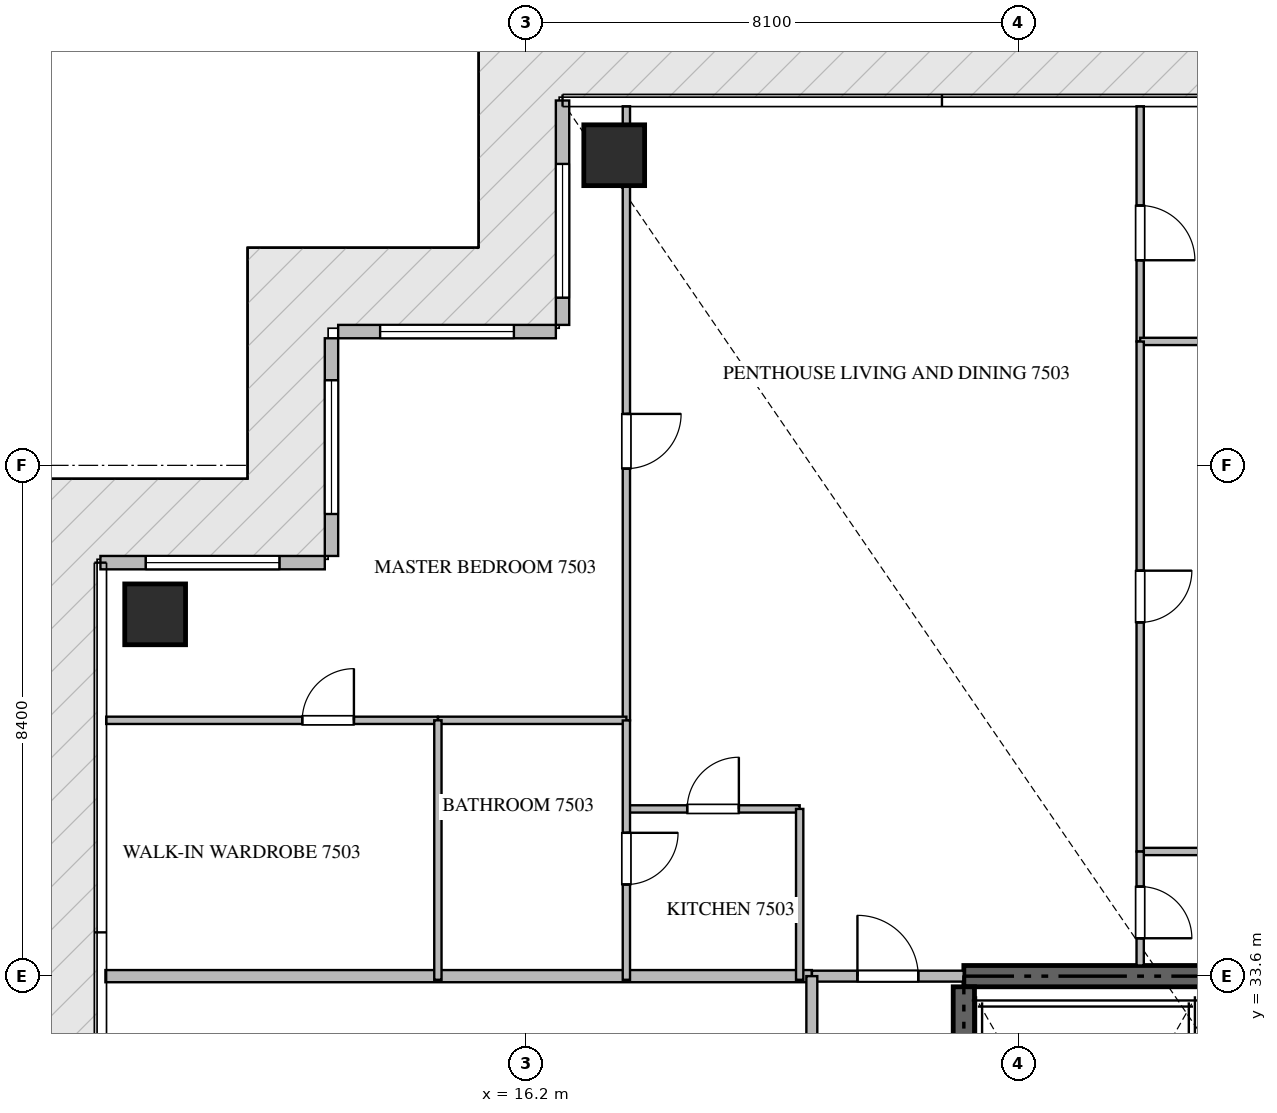
"""IFC4 building model, lengths in metres.
Left out: names, types, materials, properties, quantities, classifications, styles, units other than length and angle.
Written with IfcOpenShell. Run it as: python <this file> out.ifc"""

import sys

from ifc_helpers import new_model, si_unit, direction, frame, frame_2d, origin, origin_2d, place, context, subcontext, project, spatial, rectangle, extrude, source, transform, mapped, element, fill, save


model = new_model("IFC4")
c1 = context("Model", 3, precision=1e-05, world=origin(), true_north=direction((0.0, 1.0)))
c2 = subcontext(c1, "Body", "Model", "MODEL_VIEW")
j1 = project(units=[si_unit("LENGTHUNIT", "METRE"), si_unit("PLANEANGLEUNIT", "RADIAN")], contexts=[c1])
p1 = place(None, origin())
s1 = spatial("IfcSite", under=j1, at=p1, CompositionType="ELEMENT")
p2 = place(p1, origin())
s2 = spatial("IfcBuilding", under=s1, at=p2, CompositionType="ELEMENT")
p3 = place(p2, frame((0.0, 0.0, 301.55)))
s3 = spatial("IfcBuildingStorey", under=s2, at=p3, CompositionType="ELEMENT", Elevation=301.55)
p4 = place(p3, frame((41.4, 33.6, -0.26), z_axis=(0.0, 0.0, 1.0), x_axis=(-1.0, 0.0, 0.0)))
e1 = element("IfcWall", 1, at=p4, inside=s3, PredefinedType="SHEAR", context=c2, shape_type="SweptSolid", body=[
    extrude(rectangle(XDim=18.0, YDim=0.35, at=frame_2d((9.0, 0.0))), origin(), (0.0, 0.0, 1.0), 4.048),
])
p5 = place(p3, frame((23.4, 24.25, -0.26), z_axis=(0.0, 0.0, 1.0), x_axis=(0.0, 1.0, 0.0)))
e2 = element("IfcWall", 2, at=p5, inside=s3, PredefinedType="SHEAR", context=c2, shape_type="SweptSolid", body=[
    extrude(rectangle(XDim=9.175, YDim=0.35, at=frame_2d((4.587, 0.0))), origin(), (0.0, 0.0, 1.0), 4.048),
])
m1 = source(origin(), c2, "Body", "SweptSolid", [
    extrude(rectangle(XDim=1.0, YDim=1.0, at=origin_2d()), origin(), (0.0, 0.0, 1.0), 4.05),
])
for number, where, z_axis, x_axis in (
    (3, (17.65, 47.1, -0.26), (0.0, 0.0, 1.0), (1.0, 0.0, 0.0)),
    (4, (10.1, 39.55, -0.26), (0.0, 0.0, 1.0), (1.0, 0.0, 0.0)),
):
    element("IfcColumn", number, at=place(p3, frame(where, z_axis=z_axis, x_axis=x_axis)), inside=s3, PredefinedType="COLUMN", context=c2, shape_type="MappedRepresentation", body=[
        mapped(m1, transform((0.0, 0.0, 0.0), scale=1.0)),
    ])
p6 = place(p3, frame((16.8, 48.0, 0.0), z_axis=(0.0, 0.0, 1.0), x_axis=(0.0, -1.0, 0.0)))
e5 = element("IfcWall", 5, at=p6, inside=s3, PredefinedType="ELEMENTEDWALL", context=c2, shape_type="SweptSolid", body=[
    extrude(rectangle(XDim=3.69, YDim=0.22, at=frame_2d((1.845, 0.0))), origin(), (0.0, 0.0, 1.0), 3.775),
])
p7 = place(p6, frame((1.043, 0.0, 0.65)))
e6 = element("IfcOpeningElement", 6, at=p7, cuts=e5, PredefinedType="OPENING", context=c2, shape_type="SweptSolid", body=[
    extrude(rectangle(XDim=2.2, YDim=2.4, at=frame_2d((1.1, 1.2))), frame((0.0, 0.12, 0.0), z_axis=(0.0, -1.0, 0.0), x_axis=(1.0, 0.0, 0.0)), (0.0, 0.0, 1.0), 0.24),
])
p8 = place(p3, frame((16.69, 44.2, 0.0), z_axis=(0.0, 0.0, 1.0), x_axis=(-1.0, 0.0, 0.0)))
e7 = element("IfcWall", 7, at=p8, inside=s3, PredefinedType="ELEMENTEDWALL", context=c2, shape_type="SweptSolid", body=[
    extrude(rectangle(XDim=3.58, YDim=0.22, at=frame_2d((1.79, 0.0))), origin(), (0.0, 0.0, 1.0), 3.775),
])
p9 = place(p8, frame((0.69, 0.0, 0.65)))
e8 = element("IfcOpeningElement", 8, at=p9, cuts=e7, PredefinedType="OPENING", context=c2, shape_type="SweptSolid", body=[
    extrude(rectangle(XDim=2.2, YDim=2.4, at=frame_2d((1.1, 1.2))), frame((0.0, 0.12, 0.0), z_axis=(0.0, -1.0, 0.0), x_axis=(1.0, 0.0, 0.0)), (0.0, 0.0, 1.0), 0.24),
])
p10 = place(p3, frame((13.0, 44.09, 0.0), z_axis=(0.0, 0.0, 1.0), x_axis=(0.0, -1.0, 0.0)))
e9 = element("IfcWall", 9, at=p10, inside=s3, PredefinedType="ELEMENTEDWALL", context=c2, shape_type="SweptSolid", body=[
    extrude(rectangle(XDim=3.58, YDim=0.22, at=frame_2d((1.79, 0.0))), origin(), (0.0, 0.0, 1.0), 3.775),
])
p11 = place(p10, frame((0.69, 0.0, 0.65)))
e10 = element("IfcOpeningElement", 10, at=p11, cuts=e9, PredefinedType="OPENING", context=c2, shape_type="SweptSolid", body=[
    extrude(rectangle(XDim=2.2, YDim=2.4, at=frame_2d((1.1, 1.2))), frame((0.0, 0.12, 0.0), z_axis=(0.0, -1.0, 0.0), x_axis=(1.0, 0.0, 0.0)), (0.0, 0.0, 1.0), 0.24),
])
p12 = place(p3, frame((12.89, 40.4, 0.0), z_axis=(0.0, 0.0, 1.0), x_axis=(-1.0, 0.0, 0.0)))
e11 = element("IfcWall", 11, at=p12, inside=s3, PredefinedType="ELEMENTEDWALL", context=c2, shape_type="SweptSolid", body=[
    extrude(rectangle(XDim=3.69, YDim=0.22, at=frame_2d((1.845, 0.0))), origin(), (0.0, 0.0, 1.0), 3.775),
])
p13 = place(p12, frame((0.745, 0.0, 0.65)))
e12 = element("IfcOpeningElement", 12, at=p13, cuts=e11, PredefinedType="OPENING", context=c2, shape_type="SweptSolid", body=[
    extrude(rectangle(XDim=2.2, YDim=2.4, at=frame_2d((1.1, 1.2))), frame((0.0, 0.12, 0.0), z_axis=(0.0, -1.0, 0.0), x_axis=(1.0, 0.0, 0.0)), (0.0, 0.0, 1.0), 0.24),
])
p14 = place(p3, frame((9.282, 33.6, 0.0), z_axis=(0.0, 0.0, 1.0), x_axis=(1.0, 0.0, 0.0)))
e13 = element("IfcWall", 13, at=p14, inside=s3, PredefinedType="PARTITIONING", context=c2, shape_type="SweptSolid", body=[
    extrude(rectangle(XDim=11.618, YDim=0.2, at=frame_2d((5.809, 0.0))), origin(), (0.0, 0.0, 1.0), 3.79),
])
p15 = place(p3, frame((20.902, 33.6, 0.0), z_axis=(0.0, 0.0, 1.0), x_axis=(1.0, 0.0, 0.0)))
e14 = element("IfcWall", 14, at=p15, inside=s3, PredefinedType="PARTITIONING", context=c2, shape_type="SweptSolid", body=[
    extrude(rectangle(XDim=2.496, YDim=0.18, at=frame_2d((1.248, 0.0))), origin(), (0.0, 0.0, 1.0), 3.79),
])
p16 = place(p15, frame((0.748, 0.0, 0.0)))
e15 = element("IfcOpeningElement", 15, at=p16, cuts=e14, PredefinedType="OPENING", context=c2, shape_type="SweptSolid", body=[
    extrude(rectangle(XDim=1.0, YDim=2.15, at=frame_2d((0.5, 1.075))), frame((0.0, 0.1, 0.0), z_axis=(0.0, -1.0, 0.0), x_axis=(1.0, 0.0, 0.0)), (0.0, 0.0, 1.0), 0.2),
])
p17 = place(p3, frame((20.9, 16.8, 0.0), z_axis=(0.0, 0.0, 1.0), x_axis=(0.0, 1.0, 0.0)))
e16 = element("IfcWall", 16, at=p17, inside=s3, PredefinedType="PARTITIONING", context=c2, shape_type="SweptSolid", body=[
    extrude(rectangle(XDim=16.8, YDim=0.18, at=frame_2d((8.4, 0.0))), origin(), (0.0, 0.0, 1.0), 3.79),
])
p18 = place(p17, frame((14.5, 0.0, 0.0)))
e17 = element("IfcOpeningElement", 17, at=p18, cuts=e16, PredefinedType="OPENING", context=c2, shape_type="SweptSolid", body=[
    extrude(rectangle(XDim=1.0, YDim=2.15, at=frame_2d((0.5, 1.075))), frame((0.0, 0.1, 0.0), z_axis=(0.0, -1.0, 0.0), x_axis=(1.0, 0.0, 0.0)), (0.0, 0.0, 1.0), 0.2),
])
p19 = place(p3, frame((17.85, 36.35, 0.0), z_axis=(0.0, 0.0, 1.0), x_axis=(1.0, 0.0, 0.0)))
e18 = element("IfcWall", 18, at=p19, inside=s3, PredefinedType="PARTITIONING", context=c2, shape_type="SweptSolid", body=[
    extrude(rectangle(XDim=2.85, YDim=0.12, at=frame_2d((1.425, 0.0))), origin(), (0.0, 0.0, 1.0), 3.472),
])
p20 = place(p19, frame((1.0, 0.0, 0.0)))
e19 = element("IfcOpeningElement", 19, at=p20, cuts=e18, PredefinedType="OPENING", context=c2, shape_type="SweptSolid", body=[
    extrude(rectangle(XDim=0.85, YDim=2.1, at=frame_2d((0.425, 1.05))), frame((0.0, 0.07, 0.0), z_axis=(0.0, -1.0, 0.0), x_axis=(1.0, 0.0, 0.0)), (0.0, 0.0, 1.0), 0.14),
])
p21 = place(p3, frame((20.7, 36.35, 0.0), z_axis=(0.0, 0.0, 1.0), x_axis=(0.0, -1.0, 0.0)))
e20 = element("IfcWall", 20, at=p21, inside=s3, PredefinedType="PARTITIONING", context=c2, shape_type="SweptSolid", body=[
    extrude(rectangle(XDim=2.81, YDim=0.12, at=frame_2d((1.405, 0.0))), origin(), (0.0, 0.0, 1.0), 3.79),
])
p22 = place(p3, frame((17.85, 47.905, 0.0), z_axis=(0.0, 0.0, 1.0), x_axis=(0.0, -1.0, 0.0)))
e21 = element("IfcWall", 21, at=p22, inside=s3, PredefinedType="PARTITIONING", context=c2, shape_type="SweptSolid", body=[
    extrude(rectangle(XDim=10.098, YDim=0.12, at=frame_2d((5.049, 0.0))), origin(), (0.0, 0.0, 1.0), 3.292),
])
p23 = place(p22, frame((5.059, 0.0, 0.0)))
e22 = element("IfcOpeningElement", 22, at=p23, cuts=e21, PredefinedType="OPENING", context=c2, shape_type="SweptSolid", body=[
    extrude(rectangle(XDim=0.9, YDim=2.1, at=frame_2d((0.45, 1.05))), frame((0.0, 0.07, 0.0), z_axis=(0.0, -1.0, 0.0), x_axis=(1.0, 0.0, 0.0)), (0.0, 0.0, 1.0), 0.14),
])
p24 = place(p3, frame((9.295, 37.807, 0.0), z_axis=(0.0, 0.0, 1.0), x_axis=(1.0, 0.0, 0.0)))
e23 = element("IfcWall", 23, at=p24, inside=s3, PredefinedType="PARTITIONING", context=c2, shape_type="SweptSolid", body=[
    extrude(rectangle(XDim=5.455, YDim=0.12, at=frame_2d((2.728, 0.0))), origin(), (0.0, 0.0, 1.0), 3.79),
])
p25 = place(p24, frame((3.224, 0.0, 0.0)))
e24 = element("IfcOpeningElement", 24, at=p25, cuts=e23, PredefinedType="OPENING", context=c2, shape_type="SweptSolid", body=[
    extrude(rectangle(XDim=0.85, YDim=2.1, at=frame_2d((0.425, 1.05))), frame((0.0, 0.07, 0.0), z_axis=(0.0, -1.0, 0.0), x_axis=(1.0, 0.0, 0.0)), (0.0, 0.0, 1.0), 0.14),
])
p26 = place(p3, frame((14.752, 37.807, 0.0), z_axis=(0.0, 0.0, 1.0), x_axis=(1.0, 0.0, 0.0)))
e25 = element("IfcWall", 25, at=p26, inside=s3, PredefinedType="PARTITIONING", context=c2, shape_type="SweptSolid", body=[
    extrude(rectangle(XDim=3.098, YDim=0.12, at=frame_2d((1.549, 0.0))), origin(), (0.0, 0.0, 1.0), 3.79),
])
p27 = place(p3, frame((14.75, 37.807, 0.0), z_axis=(0.0, 0.0, 1.0), x_axis=(0.0, -1.0, 0.0)))
e26 = element("IfcWall", 26, at=p27, inside=s3, PredefinedType="PARTITIONING", context=c2, shape_type="SweptSolid", body=[
    extrude(rectangle(XDim=4.267, YDim=0.12, at=frame_2d((2.133, 0.0))), origin(), (0.0, 0.0, 1.0), 3.79),
])
p28 = place(p3, frame((17.85, 37.805, 0.0), z_axis=(0.0, 0.0, 1.0), x_axis=(0.0, -1.0, 0.0)))
e27 = element("IfcWall", 27, at=p28, inside=s3, PredefinedType="PARTITIONING", context=c2, shape_type="SweptSolid", body=[
    extrude(rectangle(XDim=4.265, YDim=0.12, at=frame_2d((2.132, 0.0))), origin(), (0.0, 0.0, 1.0), 3.372),
])
p29 = place(p28, frame((1.848, 0.0, 0.0)))
e28 = element("IfcOpeningElement", 28, at=p29, cuts=e27, PredefinedType="OPENING", context=c2, shape_type="SweptSolid", body=[
    extrude(rectangle(XDim=0.85, YDim=2.1, at=frame_2d((0.425, 1.05))), frame((0.0, 0.07, 0.0), z_axis=(0.0, -1.0, 0.0), x_axis=(1.0, 0.0, 0.0)), (0.0, 0.0, 1.0), 0.14),
])
p30 = place(p3, frame((26.3, 47.905, 0.0), z_axis=(0.0, 0.0, 1.0), x_axis=(0.0, -1.0, 0.0)))
e29 = element("IfcWall", 29, at=p30, inside=s3, PredefinedType="PARTITIONING", context=c2, shape_type="SweptSolid", body=[
    extrude(rectangle(XDim=3.867, YDim=0.12, at=frame_2d((1.934, 0.0))), origin(), (0.0, 0.0, 1.0), 3.79),
])
p31 = place(p30, frame((1.632, 0.0, 0.0)))
e30 = element("IfcOpeningElement", 30, at=p31, cuts=e29, PredefinedType="OPENING", context=c2, shape_type="SweptSolid", body=[
    extrude(rectangle(XDim=0.9, YDim=2.1, at=frame_2d((0.45, 1.05))), frame((0.0, 0.07, 0.0), z_axis=(0.0, -1.0, 0.0), x_axis=(1.0, 0.0, 0.0)), (0.0, 0.0, 1.0), 0.14),
])
for number, where, z_axis, x_axis in (
    (31, (26.3, 44.038, 0.0), (0.0, 0.0, 1.0), (1.0, 0.0, 0.0)),
    (32, (26.3, 35.65, 0.0), (0.0, 0.0, 1.0), (1.0, 0.0, 0.0)),
):
    element("IfcWall", number, at=place(p3, frame(where, z_axis=z_axis, x_axis=x_axis)), inside=s3, PredefinedType="PARTITIONING", context=c2, shape_type="SweptSolid", body=[
        extrude(rectangle(XDim=8.76, YDim=0.12, at=frame_2d((4.38, 0.0))), origin(), (0.0, 0.0, 1.0), 3.79),
    ])
p32 = place(p3, frame((26.3, 44.036, 0.0), z_axis=(0.0, 0.0, 1.0), x_axis=(0.0, -1.0, 0.0)))
e33 = element("IfcWall", 33, at=p32, inside=s3, PredefinedType="PARTITIONING", context=c2, shape_type="SweptSolid", body=[
    extrude(rectangle(XDim=8.386, YDim=0.12, at=frame_2d((4.193, 0.0))), origin(), (0.0, 0.0, 1.0), 3.79),
])
p33 = place(p32, frame((3.768, 0.0, 0.0)))
e34 = element("IfcOpeningElement", 34, at=p33, cuts=e33, PredefinedType="OPENING", context=c2, shape_type="SweptSolid", body=[
    extrude(rectangle(XDim=0.85, YDim=2.1, at=frame_2d((0.425, 1.05))), frame((0.0, 0.07, 0.0), z_axis=(0.0, -1.0, 0.0), x_axis=(1.0, 0.0, 0.0)), (0.0, 0.0, 1.0), 0.14),
])
p34 = place(p3, frame((26.3, 35.648, 0.0), z_axis=(0.0, 0.0, 1.0), x_axis=(0.0, -1.0, 0.0)))
e35 = element("IfcWall", 35, at=p34, inside=s3, PredefinedType="PARTITIONING", context=c2, shape_type="SweptSolid", body=[
    extrude(rectangle(XDim=1.873, YDim=0.12, at=frame_2d((0.937, 0.0))), origin(), (0.0, 0.0, 1.0), 3.79),
])
p35 = place(p34, frame((0.575, 0.0, 0.0)))
e36 = element("IfcOpeningElement", 36, at=p35, cuts=e35, PredefinedType="OPENING", context=c2, shape_type="SweptSolid", body=[
    extrude(rectangle(XDim=0.85, YDim=2.1, at=frame_2d((0.425, 1.05))), frame((0.0, 0.07, 0.0), z_axis=(0.0, -1.0, 0.0), x_axis=(1.0, 0.0, 0.0)), (0.0, 0.0, 1.0), 0.14),
])
m2 = source(origin(), c2, "Body", "SweptSolid", [
    extrude(rectangle(XDim=2.2, YDim=2.4, at=frame_2d((1.1, 1.2))), frame((0.0, 0.03, 0.0), z_axis=(0.0, -1.0, 0.0), x_axis=(1.0, 0.0, 0.0)), (0.0, 0.0, 1.0), 0.06),
])
p36 = place(p7, origin())
e37 = element("IfcWindow", 37, at=p36, inside=s3, PartitioningType="SINGLE_PANEL", PredefinedType="WINDOW", context=c2, shape_type="MappedRepresentation", body=[
    mapped(m2, transform((0.0, 0.0, 0.0), scale=1.0)),
])
fill(e6, e37)
p37 = place(p9, origin())
e38 = element("IfcWindow", 38, at=p37, inside=s3, PartitioningType="SINGLE_PANEL", PredefinedType="WINDOW", context=c2, shape_type="MappedRepresentation", body=[
    mapped(m2, transform((0.0, 0.0, 0.0), scale=1.0)),
])
fill(e8, e38)
p38 = place(p11, origin())
e39 = element("IfcWindow", 39, at=p38, inside=s3, PartitioningType="SINGLE_PANEL", PredefinedType="WINDOW", context=c2, shape_type="MappedRepresentation", body=[
    mapped(m2, transform((0.0, 0.0, 0.0), scale=1.0)),
])
fill(e10, e39)
p39 = place(p13, origin())
e40 = element("IfcWindow", 40, at=p39, inside=s3, PartitioningType="SINGLE_PANEL", PredefinedType="WINDOW", context=c2, shape_type="MappedRepresentation", body=[
    mapped(m2, transform((0.0, 0.0, 0.0), scale=1.0)),
])
fill(e12, e40)
m3 = source(origin(), c2, "Body", "SweptSolid", [
    extrude(rectangle(XDim=1.0, YDim=2.15, at=frame_2d((0.5, 1.075))), frame((0.0, 0.025, 0.0), z_axis=(0.0, -1.0, 0.0), x_axis=(1.0, 0.0, 0.0)), (0.0, 0.0, 1.0), 0.05),
])
p40 = place(p16, origin())
e41 = element("IfcDoor", 41, at=p40, inside=s3, OperationType="SINGLE_SWING_LEFT", PredefinedType="DOOR", context=c2, shape_type="MappedRepresentation", body=[
    mapped(m3, transform((0.0, 0.0, 0.0), scale=1.0)),
])
fill(e15, e41)
m4 = source(origin(), c2, "Body", "SweptSolid", [
    extrude(rectangle(XDim=0.85, YDim=2.1, at=frame_2d((0.425, 1.05))), frame((0.0, 0.025, 0.0), z_axis=(0.0, -1.0, 0.0), x_axis=(1.0, 0.0, 0.0)), (0.0, 0.0, 1.0), 0.05),
])
p41 = place(p20, origin())
e42 = element("IfcDoor", 42, at=p41, inside=s3, OperationType="SINGLE_SWING_RIGHT", PredefinedType="DOOR", context=c2, shape_type="MappedRepresentation", body=[
    mapped(m4, transform((0.0, 0.0, 0.0), scale=1.0)),
])
fill(e19, e42)
m5 = source(origin(), c2, "Body", "SweptSolid", [
    extrude(rectangle(XDim=0.9, YDim=2.1, at=frame_2d((0.45, 1.05))), frame((0.0, 0.025, 0.0), z_axis=(0.0, -1.0, 0.0), x_axis=(1.0, 0.0, 0.0)), (0.0, 0.0, 1.0), 0.05),
])
p42 = place(p23, origin())
e43 = element("IfcDoor", 43, at=p42, inside=s3, OperationType="SINGLE_SWING_LEFT", PredefinedType="DOOR", context=c2, shape_type="MappedRepresentation", body=[
    mapped(m5, transform((0.0, 0.0, 0.0), scale=1.0)),
])
fill(e22, e43)
p43 = place(p25, origin())
e44 = element("IfcDoor", 44, at=p43, inside=s3, OperationType="SINGLE_SWING_RIGHT", PredefinedType="DOOR", context=c2, shape_type="MappedRepresentation", body=[
    mapped(m4, transform((0.0, 0.0, 0.0), scale=1.0)),
])
fill(e24, e44)
p44 = place(p29, origin())
e45 = element("IfcDoor", 45, at=p44, inside=s3, OperationType="SINGLE_SWING_LEFT", PredefinedType="DOOR", context=c2, shape_type="MappedRepresentation", body=[
    mapped(m4, transform((0.0, 0.0, 0.0), scale=1.0)),
])
fill(e28, e45)
p45 = place(p31, origin())
e46 = element("IfcDoor", 46, at=p45, inside=s3, OperationType="SINGLE_SWING_RIGHT", PredefinedType="DOOR", context=c2, shape_type="MappedRepresentation", body=[
    mapped(m5, transform((0.0, 0.0, 0.0), scale=1.0)),
])
fill(e30, e46)
p46 = place(p33, origin())
e47 = element("IfcDoor", 47, at=p46, inside=s3, OperationType="SINGLE_SWING_LEFT", PredefinedType="DOOR", context=c2, shape_type="MappedRepresentation", body=[
    mapped(m4, transform((0.0, 0.0, 0.0), scale=1.0)),
])
fill(e34, e47)
p47 = place(p35, origin())
e48 = element("IfcDoor", 48, at=p47, inside=s3, OperationType="SINGLE_SWING_RIGHT", PredefinedType="DOOR", context=c2, shape_type="MappedRepresentation", body=[
    mapped(m4, transform((0.0, 0.0, 0.0), scale=1.0)),
])
fill(e36, e48)
save(model, sys.argv[1])
